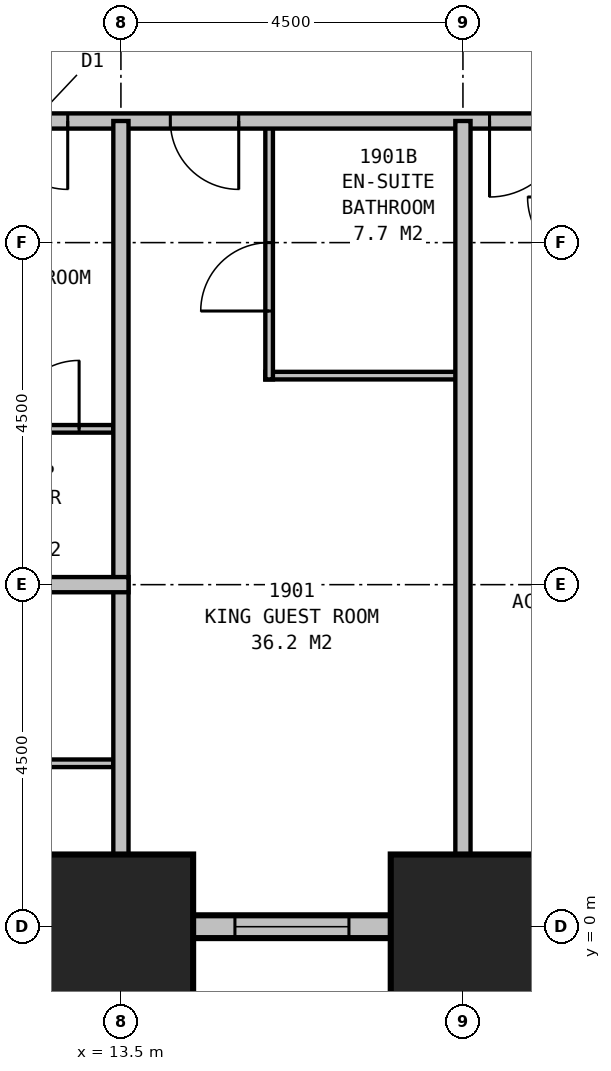
"""IFC4 building model, lengths in metres.
Left out: names, types, materials, properties, quantities, classifications, styles, units other than length and angle.
Written with IfcOpenShell. Run it as: python <this file> out.ifc"""

import sys

from ifc_helpers import new_model, si_unit, direction, frame, frame_2d, origin, origin_2d, place, context, subcontext, project, spatial, rectangle, extrude, element, fill, save


model = new_model("IFC4")
c1 = context("Model", 3, precision=1e-05, world=origin(), true_north=direction((0.0, 1.0)))
c2 = subcontext(c1, "Body", "Model", "MODEL_VIEW")
j1 = project(units=[si_unit("LENGTHUNIT", "METRE"), si_unit("PLANEANGLEUNIT", "RADIAN")], contexts=[c1])
p1 = place(None, origin())
s1 = spatial("IfcSite", under=j1, at=p1, CompositionType="ELEMENT")
p2 = place(p1, origin())
s2 = spatial("IfcBuilding", under=s1, at=p2, CompositionType="ELEMENT")
p3 = place(p2, frame((0.0, 0.0, 78.7)))
s3 = spatial("IfcBuildingStorey", under=s2, at=p3, CompositionType="ELEMENT", Elevation=78.7)
for number, where, z_axis, x_axis in (
    (1, (13.5, 0.0, 0.0), (0.0, 0.0, 1.0), (1.0, 0.0, 0.0)),
    (2, (18.0, 0.0, 0.0), (0.0, 0.0, 1.0), (1.0, 0.0, 0.0)),
):
    element("IfcColumn", number, at=place(p3, frame(where, z_axis=z_axis, x_axis=x_axis)), inside=s3, PredefinedType="COLUMN", context=c2, shape_type="SweptSolid", body=[
        extrude(rectangle(XDim=1.9, YDim=1.9, at=origin_2d()), origin(), (0.0, 0.0, 1.0), 3.5),
    ])
p4 = place(p3, frame((4.35, 0.0, 0.0), z_axis=(0.0, 0.0, 1.0), x_axis=(1.0, 0.0, 0.0)))
e3 = element("IfcWall", 3, at=p4, inside=s3, PredefinedType="STANDARD", context=c2, shape_type="SweptSolid", body=[
    extrude(rectangle(XDim=40.8, YDim=0.3, at=frame_2d((20.4, 0.0))), origin(), (0.0, 0.0, 1.0), 2.05),
])
p5 = place(p4, frame((1.65, 0.0, 0.5)))
e4 = element("IfcOpeningElement", 4, at=p5, cuts=e3, PredefinedType="OPENING", context=c2, shape_type="SweptSolid", body=[
    extrude(rectangle(XDim=1.5, YDim=1.4, at=frame_2d((0.75, 0.7))), frame((0.0, 0.16, 0.0), z_axis=(0.0, -1.0, 0.0), x_axis=(1.0, 0.0, 0.0)), (0.0, 0.0, 1.0), 0.32),
])
p6 = place(p4, frame((6.15, 0.0, 0.5)))
e5 = element("IfcOpeningElement", 5, at=p6, cuts=e3, PredefinedType="OPENING", context=c2, shape_type="SweptSolid", body=[
    extrude(rectangle(XDim=1.5, YDim=1.4, at=frame_2d((0.75, 0.7))), frame((0.0, 0.16, 0.0), z_axis=(0.0, -1.0, 0.0), x_axis=(1.0, 0.0, 0.0)), (0.0, 0.0, 1.0), 0.32),
])
p7 = place(p4, frame((10.65, 0.0, 0.5)))
e6 = element("IfcOpeningElement", 6, at=p7, cuts=e3, PredefinedType="OPENING", context=c2, shape_type="SweptSolid", body=[
    extrude(rectangle(XDim=1.5, YDim=1.4, at=frame_2d((0.75, 0.7))), frame((0.0, 0.16, 0.0), z_axis=(0.0, -1.0, 0.0), x_axis=(1.0, 0.0, 0.0)), (0.0, 0.0, 1.0), 0.32),
])
p8 = place(p4, frame((15.15, 0.0, 0.5)))
e7 = element("IfcOpeningElement", 7, at=p8, cuts=e3, PredefinedType="OPENING", context=c2, shape_type="SweptSolid", body=[
    extrude(rectangle(XDim=1.5, YDim=1.4, at=frame_2d((0.75, 0.7))), frame((0.0, 0.16, 0.0), z_axis=(0.0, -1.0, 0.0), x_axis=(1.0, 0.0, 0.0)), (0.0, 0.0, 1.0), 0.32),
])
p9 = place(p4, frame((19.65, 0.0, 0.5)))
e8 = element("IfcOpeningElement", 8, at=p9, cuts=e3, PredefinedType="OPENING", context=c2, shape_type="SweptSolid", body=[
    extrude(rectangle(XDim=1.5, YDim=1.4, at=frame_2d((0.75, 0.7))), frame((0.0, 0.16, 0.0), z_axis=(0.0, -1.0, 0.0), x_axis=(1.0, 0.0, 0.0)), (0.0, 0.0, 1.0), 0.32),
])
p10 = place(p4, frame((24.15, 0.0, 0.5)))
e9 = element("IfcOpeningElement", 9, at=p10, cuts=e3, PredefinedType="OPENING", context=c2, shape_type="SweptSolid", body=[
    extrude(rectangle(XDim=1.5, YDim=1.4, at=frame_2d((0.75, 0.7))), frame((0.0, 0.16, 0.0), z_axis=(0.0, -1.0, 0.0), x_axis=(1.0, 0.0, 0.0)), (0.0, 0.0, 1.0), 0.32),
])
p11 = place(p4, frame((28.65, 0.0, 0.5)))
e10 = element("IfcOpeningElement", 10, at=p11, cuts=e3, PredefinedType="OPENING", context=c2, shape_type="SweptSolid", body=[
    extrude(rectangle(XDim=1.5, YDim=1.4, at=frame_2d((0.75, 0.7))), frame((0.0, 0.16, 0.0), z_axis=(0.0, -1.0, 0.0), x_axis=(1.0, 0.0, 0.0)), (0.0, 0.0, 1.0), 0.32),
])
p12 = place(p4, frame((33.15, 0.0, 0.5)))
e11 = element("IfcOpeningElement", 11, at=p12, cuts=e3, PredefinedType="OPENING", context=c2, shape_type="SweptSolid", body=[
    extrude(rectangle(XDim=1.5, YDim=1.4, at=frame_2d((0.75, 0.7))), frame((0.0, 0.16, 0.0), z_axis=(0.0, -1.0, 0.0), x_axis=(1.0, 0.0, 0.0)), (0.0, 0.0, 1.0), 0.32),
])
p13 = place(p4, frame((37.65, 0.0, 0.5)))
e12 = element("IfcOpeningElement", 12, at=p13, cuts=e3, PredefinedType="OPENING", context=c2, shape_type="SweptSolid", body=[
    extrude(rectangle(XDim=1.5, YDim=1.4, at=frame_2d((0.75, 0.7))), frame((0.0, 0.16, 0.0), z_axis=(0.0, -1.0, 0.0), x_axis=(1.0, 0.0, 0.0)), (0.0, 0.0, 1.0), 0.32),
])
p14 = place(p3, frame((11.2, 10.6, 0.0), z_axis=(0.0, 0.0, 1.0), x_axis=(1.0, 0.0, 0.0)))
e13 = element("IfcWall", 13, at=p14, inside=s3, PredefinedType="PARTITIONING", context=c2, shape_type="SweptSolid", body=[
    extrude(rectangle(XDim=27.1, YDim=0.2, at=frame_2d((13.55, 0.0))), origin(), (0.0, 0.0, 1.0), 3.25),
])
p15 = place(p14, frame((3.85, 0.0, 0.0), z_axis=(0.0, 0.0, 1.0), x_axis=(-1.0, 0.0, 0.0)))
e14 = element("IfcOpeningElement", 14, at=p15, cuts=e13, PredefinedType="OPENING", context=c2, shape_type="SweptSolid", body=[
    extrude(rectangle(XDim=0.9, YDim=2.1, at=frame_2d((0.45, 1.05))), frame((0.0, 0.11, 0.0), z_axis=(0.0, -1.0, 0.0), x_axis=(1.0, 0.0, 0.0)), (0.0, 0.0, 1.0), 0.22),
])
p16 = place(p14, frame((8.15, 0.0, 0.0), z_axis=(0.0, 0.0, 1.0), x_axis=(-1.0, 0.0, 0.0)))
e15 = element("IfcOpeningElement", 15, at=p16, cuts=e13, PredefinedType="OPENING", context=c2, shape_type="SweptSolid", body=[
    extrude(rectangle(XDim=1.0, YDim=2.1, at=frame_2d((0.5, 1.05))), frame((0.0, 0.11, 0.0), z_axis=(0.0, -1.0, 0.0), x_axis=(1.0, 0.0, 0.0)), (0.0, 0.0, 1.0), 0.22),
])
p17 = place(p14, frame((12.85, 0.0, 0.0), z_axis=(0.0, 0.0, 1.0), x_axis=(-1.0, 0.0, 0.0)))
e16 = element("IfcOpeningElement", 16, at=p17, cuts=e13, PredefinedType="OPENING", context=c2, shape_type="SweptSolid", body=[
    extrude(rectangle(XDim=0.9, YDim=2.1, at=frame_2d((0.45, 1.05))), frame((0.0, 0.11, 0.0), z_axis=(0.0, -1.0, 0.0), x_axis=(1.0, 0.0, 0.0)), (0.0, 0.0, 1.0), 0.22),
])
p18 = place(p14, frame((17.1, 0.0, 0.0), z_axis=(0.0, 0.0, 1.0), x_axis=(-1.0, 0.0, 0.0)))
e17 = element("IfcOpeningElement", 17, at=p18, cuts=e13, PredefinedType="OPENING", context=c2, shape_type="SweptSolid", body=[
    extrude(rectangle(XDim=1.0, YDim=2.1, at=frame_2d((0.5, 1.05))), frame((0.0, 0.11, 0.0), z_axis=(0.0, -1.0, 0.0), x_axis=(1.0, 0.0, 0.0)), (0.0, 0.0, 1.0), 0.22),
])
p19 = place(p14, frame((21.85, 0.0, 0.0), z_axis=(0.0, 0.0, 1.0), x_axis=(-1.0, 0.0, 0.0)))
e18 = element("IfcOpeningElement", 18, at=p19, cuts=e13, PredefinedType="OPENING", context=c2, shape_type="SweptSolid", body=[
    extrude(rectangle(XDim=0.9, YDim=2.1, at=frame_2d((0.45, 1.05))), frame((0.0, 0.11, 0.0), z_axis=(0.0, -1.0, 0.0), x_axis=(1.0, 0.0, 0.0)), (0.0, 0.0, 1.0), 0.22),
])
p20 = place(p14, frame((1.6, 0.0, 0.0), z_axis=(0.0, 0.0, 1.0), x_axis=(-1.0, 0.0, 0.0)))
e19 = element("IfcOpeningElement", 19, at=p20, cuts=e13, PredefinedType="OPENING", context=c2, shape_type="SweptSolid", body=[
    extrude(rectangle(XDim=0.9, YDim=2.1, at=frame_2d((0.45, 1.05))), frame((0.0, 0.11, 0.0), z_axis=(0.0, -1.0, 0.0), x_axis=(1.0, 0.0, 0.0)), (0.0, 0.0, 1.0), 0.22),
])
p21 = place(p14, frame((26.4, 0.0, 0.0), z_axis=(0.0, 0.0, 1.0), x_axis=(-1.0, 0.0, 0.0)))
e20 = element("IfcOpeningElement", 20, at=p21, cuts=e13, PredefinedType="OPENING", context=c2, shape_type="SweptSolid", body=[
    extrude(rectangle(XDim=0.9, YDim=2.1, at=frame_2d((0.45, 1.05))), frame((0.0, 0.11, 0.0), z_axis=(0.0, -1.0, 0.0), x_axis=(1.0, 0.0, 0.0)), (0.0, 0.0, 1.0), 0.22),
])
p22 = place(p3, frame((18.0, 10.6, 0.0), z_axis=(0.0, 0.0, 1.0), x_axis=(0.0, -1.0, 0.0)))
e21 = element("IfcWall", 21, at=p22, inside=s3, PredefinedType="PARTITIONING", context=c2, shape_type="SweptSolid", body=[
    extrude(rectangle(XDim=10.6, YDim=0.2, at=frame_2d((5.3, 0.0))), origin(), (0.0, 0.0, 1.0), 2.25),
])
p23 = place(p3, frame((15.4, 7.25, 0.0), z_axis=(0.0, 0.0, 1.0), x_axis=(1.0, 0.0, 0.0)))
e22 = element("IfcWall", 22, at=p23, inside=s3, PredefinedType="PLUMBINGWALL", context=c2, shape_type="SweptSolid", body=[
    extrude(rectangle(XDim=2.6, YDim=0.1, at=frame_2d((1.3, 0.0))), origin(), (0.0, 0.0, 1.0), 3.25),
])
p24 = place(p3, frame((15.45, 10.6, 0.0), z_axis=(0.0, 0.0, 1.0), x_axis=(0.0, -1.0, 0.0)))
e23 = element("IfcWall", 23, at=p24, inside=s3, PredefinedType="PLUMBINGWALL", context=c2, shape_type="SweptSolid", body=[
    extrude(rectangle(XDim=3.4, YDim=0.1, at=frame_2d((1.7, 0.0))), origin(), (0.0, 0.0, 1.0), 3.25),
])
p25 = place(p24, frame((2.5, 0.0, 0.0), z_axis=(0.0, 0.0, 1.0), x_axis=(-1.0, 0.0, 0.0)))
e24 = element("IfcOpeningElement", 24, at=p25, cuts=e23, PredefinedType="OPENING", context=c2, shape_type="SweptSolid", body=[
    extrude(rectangle(XDim=0.9, YDim=2.1, at=frame_2d((0.45, 1.05))), frame((0.0, 0.06, 0.0), z_axis=(0.0, -1.0, 0.0), x_axis=(1.0, 0.0, 0.0)), (0.0, 0.0, 1.0), 0.12),
])
p26 = place(p3, frame((13.5, 10.6, 0.0), z_axis=(0.0, 0.0, 1.0), x_axis=(0.0, -1.0, 0.0)))
e25 = element("IfcWall", 25, at=p26, inside=s3, PredefinedType="PARTITIONING", context=c2, shape_type="SweptSolid", body=[
    extrude(rectangle(XDim=10.6, YDim=0.2, at=frame_2d((5.3, 0.0))), origin(), (0.0, 0.0, 1.0), 2.25),
])
p27 = place(p3, frame((13.6, 4.5, 0.0), z_axis=(0.0, 0.0, 1.0), x_axis=(-1.0, 0.0, 0.0)))
e26 = element("IfcWall", 26, at=p27, inside=s3, PredefinedType="PARTITIONING", context=c2, shape_type="SweptSolid", body=[
    extrude(rectangle(XDim=9.1, YDim=0.2, at=frame_2d((4.55, 0.0))), origin(), (0.0, 0.0, 1.0), 3.25),
])
p28 = place(p27, frame((7.1, 0.0, 0.0)))
e27 = element("IfcOpeningElement", 27, at=p28, cuts=e26, PredefinedType="OPENING", context=c2, shape_type="SweptSolid", body=[
    extrude(rectangle(XDim=0.9, YDim=2.1, at=frame_2d((0.45, 1.05))), frame((0.0, 0.11, 0.0), z_axis=(0.0, -1.0, 0.0), x_axis=(1.0, 0.0, 0.0)), (0.0, 0.0, 1.0), 0.22),
])
p29 = place(p3, frame((13.4, 6.55, 0.0), z_axis=(0.0, 0.0, 1.0), x_axis=(-1.0, 0.0, 0.0)))
e28 = element("IfcWall", 28, at=p29, inside=s3, PredefinedType="PLUMBINGWALL", context=c2, shape_type="SweptSolid", body=[
    extrude(rectangle(XDim=1.8, YDim=0.1, at=frame_2d((0.9, 0.0))), origin(), (0.0, 0.0, 1.0), 3.25),
])
p30 = place(p29, frame((1.35, 0.0, 0.0), z_axis=(0.0, 0.0, 1.0), x_axis=(-1.0, 0.0, 0.0)))
e29 = element("IfcOpeningElement", 29, at=p30, cuts=e28, PredefinedType="OPENING", context=c2, shape_type="SweptSolid", body=[
    extrude(rectangle(XDim=0.9, YDim=2.1, at=frame_2d((0.45, 1.05))), frame((0.0, 0.06, 0.0), z_axis=(0.0, -1.0, 0.0), x_axis=(1.0, 0.0, 0.0)), (0.0, 0.0, 1.0), 0.12),
])
p31 = place(p3, frame((13.4, 2.15, 0.0), z_axis=(0.0, 0.0, 1.0), x_axis=(-1.0, 0.0, 0.0)))
e30 = element("IfcWall", 30, at=p31, inside=s3, PredefinedType="PLUMBINGWALL", context=c2, shape_type="SweptSolid", body=[
    extrude(rectangle(XDim=2.7, YDim=0.1, at=frame_2d((1.35, 0.0))), origin(), (0.0, 0.0, 1.0), 3.25),
])
p32 = place(p31, frame((0.9, 0.0, 0.0)))
e31 = element("IfcOpeningElement", 31, at=p32, cuts=e30, PredefinedType="OPENING", context=c2, shape_type="SweptSolid", body=[
    extrude(rectangle(XDim=0.9, YDim=2.1, at=frame_2d((0.45, 1.05))), frame((0.0, 0.06, 0.0), z_axis=(0.0, -1.0, 0.0), x_axis=(1.0, 0.0, 0.0)), (0.0, 0.0, 1.0), 0.12),
])
p33 = place(p7, origin())
e32 = element("IfcWindow", 32, at=p33, inside=s3, PartitioningType="SINGLE_PANEL", PredefinedType="WINDOW", context=c2, shape_type="SweptSolid", body=[
    extrude(rectangle(XDim=1.5, YDim=1.4, at=frame_2d((0.75, 0.7))), frame((0.0, 0.03, 0.0), z_axis=(0.0, -1.0, 0.0), x_axis=(1.0, 0.0, 0.0)), (0.0, 0.0, 1.0), 0.06),
])
fill(e6, e32)
p34 = place(p15, origin())
e33 = element("IfcDoor", 33, at=p34, inside=s3, OperationType="SINGLE_SWING_LEFT", PredefinedType="DOOR", context=c2, shape_type="SweptSolid", body=[
    extrude(rectangle(XDim=0.9, YDim=2.1, at=frame_2d((0.45, 1.05))), frame((0.0, 0.025, 0.0), z_axis=(0.0, -1.0, 0.0), x_axis=(1.0, 0.0, 0.0)), (0.0, 0.0, 1.0), 0.05),
])
fill(e14, e33)
p35 = place(p16, origin())
e34 = element("IfcDoor", 34, at=p35, inside=s3, OperationType="SINGLE_SWING_RIGHT", PredefinedType="DOOR", context=c2, shape_type="SweptSolid", body=[
    extrude(rectangle(XDim=1.0, YDim=2.1, at=frame_2d((0.5, 1.05))), frame((0.0, 0.025, 0.0), z_axis=(0.0, -1.0, 0.0), x_axis=(1.0, 0.0, 0.0)), (0.0, 0.0, 1.0), 0.05),
])
fill(e15, e34)
p36 = place(p20, origin())
e35 = element("IfcDoor", 35, at=p36, inside=s3, OperationType="SINGLE_SWING_LEFT", PredefinedType="DOOR", context=c2, shape_type="SweptSolid", body=[
    extrude(rectangle(XDim=0.9, YDim=2.1, at=frame_2d((0.45, 1.05))), frame((0.0, 0.025, 0.0), z_axis=(0.0, -1.0, 0.0), x_axis=(1.0, 0.0, 0.0)), (0.0, 0.0, 1.0), 0.05),
])
fill(e19, e35)
p37 = place(p25, origin())
e36 = element("IfcDoor", 36, at=p37, inside=s3, OperationType="SINGLE_SWING_LEFT", PredefinedType="DOOR", context=c2, shape_type="SweptSolid", body=[
    extrude(rectangle(XDim=0.9, YDim=2.1, at=frame_2d((0.45, 1.05))), frame((0.0, 0.025, 0.0), z_axis=(0.0, -1.0, 0.0), x_axis=(1.0, 0.0, 0.0)), (0.0, 0.0, 1.0), 0.05),
])
fill(e24, e36)
p38 = place(p30, origin())
e37 = element("IfcDoor", 37, at=p38, inside=s3, OperationType="SINGLE_SWING_RIGHT", PredefinedType="DOOR", context=c2, shape_type="SweptSolid", body=[
    extrude(rectangle(XDim=0.9, YDim=2.1, at=frame_2d((0.45, 1.05))), frame((0.0, 0.025, 0.0), z_axis=(0.0, -1.0, 0.0), x_axis=(1.0, 0.0, 0.0)), (0.0, 0.0, 1.0), 0.05),
])
fill(e29, e37)
save(model, sys.argv[1])
